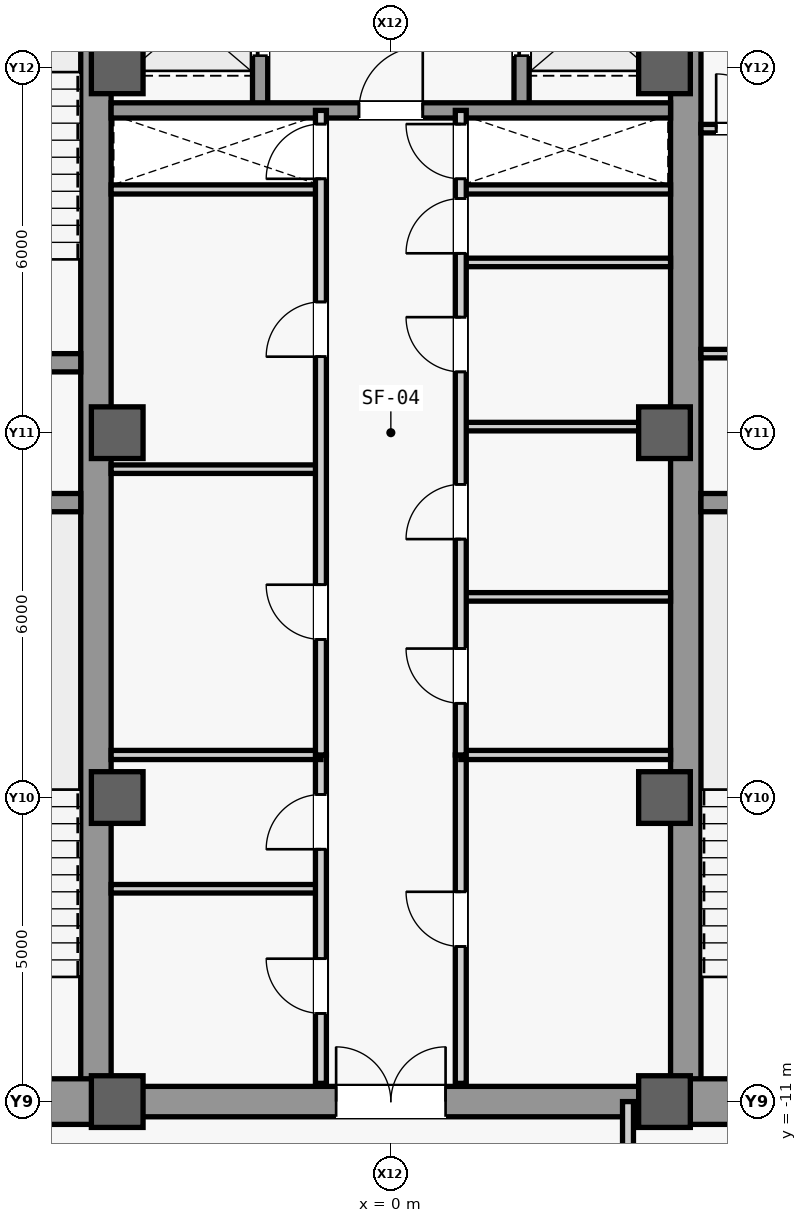
"""IFC4 building model, lengths in metres.
Left out: names, types, materials, properties, quantities, classifications, styles, units other than length and angle.
Written with IfcOpenShell. Run it as: python <this file> out.ifc"""

import sys

from ifc_helpers import new_model, si_unit, direction, frame, frame_2d, origin, origin_2d, place, context, subcontext, project, spatial, rectangle, extrude, source, transform, mapped, element, fill, save


model = new_model("IFC4")
c1 = context("Model", 3, precision=1e-05, world=origin(), true_north=direction((0.0, 1.0)))
c2 = subcontext(c1, "Body", "Model", "MODEL_VIEW")
j1 = project(units=[si_unit("LENGTHUNIT", "METRE"), si_unit("PLANEANGLEUNIT", "RADIAN")], contexts=[c1])
p1 = place(None, origin())
s1 = spatial("IfcSite", under=j1, at=p1, CompositionType="ELEMENT")
p2 = place(p1, origin())
s2 = spatial("IfcBuilding", under=s1, at=p2, CompositionType="ELEMENT")
p3 = place(p2, frame((0.0, 0.0, 207.1)))
s3 = spatial("IfcBuildingStorey", under=s2, at=p3, CompositionType="ELEMENT", Elevation=207.1)
m1 = source(origin(), c2, "Body", "SweptSolid", [
    extrude(rectangle(XDim=21.4, YDim=0.5, at=frame_2d((10.7, 0.0))), origin(), (0.0, 0.0, 1.0), 3.78),
])
for number, where, z_axis, x_axis in (
    (1, (-4.85, -10.7, 0.0), (0.0, 0.0, 1.0), (0.0, 1.0, 0.0)),
    (2, (4.85, -10.7, 0.0), (0.0, 0.0, 1.0), (0.0, 1.0, 0.0)),
):
    element("IfcWall", number, at=place(p3, frame(where, z_axis=z_axis, x_axis=x_axis)), inside=s3, PredefinedType="SHEAR", context=c2, shape_type="MappedRepresentation", body=[
        mapped(m1, transform((0.0, 0.0, 0.0), scale=1.0)),
    ])
m2 = source(origin(), c2, "Body", "SweptSolid", [
    extrude(rectangle(XDim=5.85, YDim=0.75, at=frame_2d((2.925, 0.0))), origin(), (0.0, 0.0, 1.0), 3.78),
])
for number, where, z_axis, x_axis in (
    (3, (-10.7, -11.0, 0.0), (0.0, 0.0, 1.0), (1.0, 0.0, 0.0)),
    (4, (4.85, -11.0, 0.0), (0.0, 0.0, 1.0), (1.0, 0.0, 0.0)),
):
    element("IfcWall", number, at=place(p3, frame(where, z_axis=z_axis, x_axis=x_axis)), inside=s3, PredefinedType="SHEAR", context=c2, shape_type="MappedRepresentation", body=[
        mapped(m2, transform((0.0, 0.0, 0.0), scale=1.0)),
    ])
m3 = source(origin(), c2, "Body", "SweptSolid", [
    extrude(rectangle(XDim=5.6, YDim=0.3, at=frame_2d((2.8, 0.0))), origin(), (0.0, 0.0, 1.0), 3.78),
])
for number, where, z_axis, x_axis in (
    (5, (-10.7, -1.15, 0.0), (0.0, 0.0, 1.0), (1.0, 0.0, 0.0)),
    (6, (-10.7, 1.15, 0.0), (0.0, 0.0, 1.0), (1.0, 0.0, 0.0)),
    (7, (5.1, -1.15, 0.0), (0.0, 0.0, 1.0), (1.0, 0.0, 0.0)),
):
    element("IfcWall", number, at=place(p3, frame(where, z_axis=z_axis, x_axis=x_axis)), inside=s3, PredefinedType="SHEAR", context=c2, shape_type="MappedRepresentation", body=[
        mapped(m3, transform((0.0, 0.0, 0.0), scale=1.0)),
    ])
m4 = source(origin(), c2, "Body", "SweptSolid", [
    extrude(rectangle(XDim=9.2, YDim=0.5, at=frame_2d((4.6, 0.0))), origin(), (0.0, 0.0, 1.0), 3.78),
])
p4 = place(p3, frame((-4.6, -11.0, 0.0), z_axis=(0.0, 0.0, 1.0), x_axis=(1.0, 0.0, 0.0)))
e8 = element("IfcWall", 8, at=p4, inside=s3, PredefinedType="SHEAR", context=c2, shape_type="MappedRepresentation", body=[
    mapped(m4, transform((0.0, 0.0, 0.0), scale=1.0)),
])
m5 = source(origin(), c2, "Body", "SweptSolid", [
    extrude(rectangle(XDim=1.8, YDim=2.25, at=frame_2d((0.9, 1.125))), frame((0.0, 0.26, 0.0), z_axis=(0.0, -1.0, 0.0), x_axis=(1.0, 0.0, 0.0)), (0.0, 0.0, 1.0), 0.52),
])
p5 = place(p4, frame((3.7, 0.0, 0.0)))
e9 = element("IfcOpeningElement", 9, at=p5, cuts=e8, PredefinedType="OPENING", context=c2, shape_type="MappedRepresentation", body=[
    mapped(m5, transform((0.0, 0.0, 0.0), scale=1.0)),
])
m6 = source(origin(), c2, "Body", "SweptSolid", [
    extrude(rectangle(XDim=0.85, YDim=0.85, at=origin_2d()), origin(), (0.0, 0.0, 1.0), 4.0),
])
for number, where, z_axis, x_axis in (
    (10, (-4.5, -11.0, 0.0), (0.0, 0.0, 1.0), (1.0, 0.0, 0.0)),
    (11, (-4.5, -6.0, 0.0), (0.0, 0.0, 1.0), (1.0, 0.0, 0.0)),
    (12, (-4.5, 0.0, 0.0), (0.0, 0.0, 1.0), (1.0, 0.0, 0.0)),
    (13, (-4.5, 6.0, 0.0), (0.0, 0.0, 1.0), (1.0, 0.0, 0.0)),
    (14, (4.5, -11.0, 0.0), (0.0, 0.0, 1.0), (1.0, 0.0, 0.0)),
    (15, (4.5, -6.0, 0.0), (0.0, 0.0, 1.0), (1.0, 0.0, 0.0)),
    (16, (4.5, 0.0, 0.0), (0.0, 0.0, 1.0), (1.0, 0.0, 0.0)),
    (17, (4.5, 6.0, 0.0), (0.0, 0.0, 1.0), (1.0, 0.0, 0.0)),
):
    element("IfcColumn", number, at=place(p3, frame(where, z_axis=z_axis, x_axis=x_axis)), inside=s3, PredefinedType="COLUMN", context=c2, shape_type="MappedRepresentation", body=[
        mapped(m6, transform((0.0, 0.0, 0.0), scale=1.0)),
    ])
m7 = source(origin(), c2, "Body", "SweptSolid", [
    extrude(rectangle(XDim=3.15, YDim=0.14, at=frame_2d((1.575, 0.0))), origin(), (0.0, 0.0, 1.0), 3.78),
])
p6 = place(p3, frame((5.1, 1.3, 0.0), z_axis=(0.0, 0.0, 1.0), x_axis=(1.0, 0.0, 0.0)))
e18 = element("IfcWall", 18, at=p6, inside=s3, PredefinedType="PARTITIONING", context=c2, shape_type="MappedRepresentation", body=[
    mapped(m7, transform((0.0, 0.0, 0.0), scale=1.0)),
])
p7 = place(p3, frame((5.1, 5.0, 0.0), z_axis=(0.0, 0.0, 1.0), x_axis=(1.0, 0.0, 0.0)))
e19 = element("IfcWall", 19, at=p7, inside=s3, PredefinedType="PARTITIONING", context=c2, shape_type="MappedRepresentation", body=[
    mapped(m7, transform((0.0, 0.0, 0.0), scale=1.0)),
])
m8 = source(origin(), c2, "Body", "SweptSolid", [
    extrude(rectangle(XDim=0.9, YDim=2.15, at=frame_2d((0.45, 1.075))), frame((0.0, 0.08, 0.0), z_axis=(0.0, -1.0, 0.0), x_axis=(1.0, 0.0, 0.0)), (0.0, 0.0, 1.0), 0.16),
])
p8 = place(p7, frame((0.25, 0.0, 0.0)))
e20 = element("IfcOpeningElement", 20, at=p8, cuts=e19, PredefinedType="OPENING", context=c2, shape_type="MappedRepresentation", body=[
    mapped(m8, transform((0.0, 0.0, 0.0), scale=1.0)),
])
m9 = source(origin(), c2, "Body", "SweptSolid", [
    extrude(rectangle(XDim=3.45, YDim=0.15, at=frame_2d((1.725, 0.0))), origin(), (0.0, 0.0, 1.0), 3.78),
])
for number, where, z_axis, x_axis in (
    (21, (-4.6, 4.0, 0.0), (0.0, 0.0, 1.0), (1.0, 0.0, 0.0)),
    (22, (1.15, 4.0, 0.0), (0.0, 0.0, 1.0), (1.0, 0.0, 0.0)),
):
    element("IfcWall", number, at=place(p3, frame(where, z_axis=z_axis, x_axis=x_axis)), inside=s3, PredefinedType="PARTITIONING", context=c2, shape_type="MappedRepresentation", body=[
        mapped(m9, transform((0.0, 0.0, 0.0), scale=1.0)),
    ])
m10 = source(origin(), c2, "Body", "SweptSolid", [
    extrude(rectangle(XDim=3.45, YDim=0.14, at=frame_2d((1.725, 0.0))), origin(), (0.0, 0.0, 1.0), 3.78),
])
p9 = place(p3, frame((-4.6, -7.5, 0.0), z_axis=(0.0, 0.0, 1.0), x_axis=(1.0, 0.0, 0.0)))
e23 = element("IfcWall", 23, at=p9, inside=s3, PredefinedType="PARTITIONING", context=c2, shape_type="MappedRepresentation", body=[
    mapped(m10, transform((0.0, 0.0, 0.0), scale=1.0)),
])
m11 = source(origin(), c2, "Body", "SweptSolid", [
    extrude(rectangle(XDim=5.4, YDim=0.18, at=frame_2d((2.7, 0.0))), origin(), (0.0, 0.0, 1.0), 3.78),
])
p10 = place(p3, frame((-1.15, -10.7, 0.0), z_axis=(0.0, 0.0, 1.0), x_axis=(0.0, 1.0, 0.0)))
e24 = element("IfcWall", 24, at=p10, inside=s3, PredefinedType="PARTITIONING", context=c2, shape_type="MappedRepresentation", body=[
    mapped(m11, transform((0.0, 0.0, 0.0), scale=1.0)),
])
m12 = source(origin(), c2, "Body", "SweptSolid", [
    extrude(rectangle(XDim=0.9, YDim=2.15, at=frame_2d((0.45, 1.075))), frame((0.0, 0.1, 0.0), z_axis=(0.0, -1.0, 0.0), x_axis=(1.0, 0.0, 0.0)), (0.0, 0.0, 1.0), 0.2),
])
p11 = place(p10, frame((1.15, 0.0, 0.0)))
e25 = element("IfcOpeningElement", 25, at=p11, cuts=e24, PredefinedType="OPENING", context=c2, shape_type="MappedRepresentation", body=[
    mapped(m12, transform((0.0, 0.0, 0.0), scale=1.0)),
])
p12 = place(p10, frame((3.85, 0.0, 0.0)))
e26 = element("IfcOpeningElement", 26, at=p12, cuts=e24, PredefinedType="OPENING", context=c2, shape_type="MappedRepresentation", body=[
    mapped(m12, transform((0.0, 0.0, 0.0), scale=1.0)),
])
p13 = place(p3, frame((1.15, -10.7, 0.0), z_axis=(0.0, 0.0, 1.0), x_axis=(0.0, 1.0, 0.0)))
e27 = element("IfcWall", 27, at=p13, inside=s3, PredefinedType="PARTITIONING", context=c2, shape_type="MappedRepresentation", body=[
    mapped(m11, transform((0.0, 0.0, 0.0), scale=1.0)),
])
p14 = place(p13, frame((2.25, 0.0, 0.0)))
e28 = element("IfcOpeningElement", 28, at=p14, cuts=e27, PredefinedType="OPENING", context=c2, shape_type="MappedRepresentation", body=[
    mapped(m12, transform((0.0, 0.0, 0.0), scale=1.0)),
])
for number, where, z_axis, x_axis in (
    (29, (-4.6, -5.3, 0.0), (0.0, 0.0, 1.0), (1.0, 0.0, 0.0)),
    (30, (1.15, -5.3, 0.0), (0.0, 0.0, 1.0), (1.0, 0.0, 0.0)),
):
    element("IfcWall", number, at=place(p3, frame(where, z_axis=z_axis, x_axis=x_axis)), inside=s3, PredefinedType="PARTITIONING", context=c2, shape_type="MappedRepresentation", body=[
        mapped(m9, transform((0.0, 0.0, 0.0), scale=1.0)),
    ])
m13 = source(origin(), c2, "Body", "SweptSolid", [
    extrude(rectangle(XDim=5.4, YDim=0.25, at=frame_2d((2.7, 0.0))), origin(), (0.0, 0.0, 1.0), 3.78),
])
p15 = place(p3, frame((-2.15, 5.3, 0.0), z_axis=(0.0, 0.0, 1.0), x_axis=(0.0, 1.0, 0.0)))
e31 = element("IfcWall", 31, at=p15, inside=s3, PredefinedType="SHEAR", context=c2, shape_type="MappedRepresentation", body=[
    mapped(m13, transform((0.0, 0.0, 0.0), scale=1.0)),
])
m14 = source(origin(), c2, "Body", "SweptSolid", [
    extrude(rectangle(XDim=1.2, YDim=2.3, at=frame_2d((0.6, 1.15))), frame((0.0, 0.135, 0.0), z_axis=(0.0, -1.0, 0.0), x_axis=(1.0, 0.0, 0.0)), (0.0, 0.0, 1.0), 0.27),
])
p16 = place(p15, frame((3.3, 0.0, 0.0)))
e32 = element("IfcOpeningElement", 32, at=p16, cuts=e31, PredefinedType="OPENING", context=c2, shape_type="MappedRepresentation", body=[
    mapped(m14, transform((0.0, 0.0, 0.0), scale=1.0)),
])
p17 = place(p15, frame((0.9, 0.0, 0.0)))
e33 = element("IfcOpeningElement", 33, at=p17, cuts=e31, PredefinedType="OPENING", context=c2, shape_type="MappedRepresentation", body=[
    mapped(m14, transform((0.0, 0.0, 0.0), scale=1.0)),
])
p18 = place(p3, frame((2.15, 5.3, 0.0), z_axis=(0.0, 0.0, 1.0), x_axis=(0.0, 1.0, 0.0)))
e34 = element("IfcWall", 34, at=p18, inside=s3, PredefinedType="SHEAR", context=c2, shape_type="MappedRepresentation", body=[
    mapped(m13, transform((0.0, 0.0, 0.0), scale=1.0)),
])
p19 = place(p18, frame((3.3, 0.0, 0.0)))
e35 = element("IfcOpeningElement", 35, at=p19, cuts=e34, PredefinedType="OPENING", context=c2, shape_type="MappedRepresentation", body=[
    mapped(m14, transform((0.0, 0.0, 0.0), scale=1.0)),
])
p20 = place(p18, frame((0.9, 0.0, 0.0)))
e36 = element("IfcOpeningElement", 36, at=p20, cuts=e34, PredefinedType="OPENING", context=c2, shape_type="MappedRepresentation", body=[
    mapped(m14, transform((0.0, 0.0, 0.0), scale=1.0)),
])
m15 = source(origin(), c2, "Body", "SweptSolid", [
    extrude(rectangle(XDim=9.2, YDim=0.25, at=frame_2d((4.6, 0.0))), origin(), (0.0, 0.0, 1.0), 3.78),
])
p21 = place(p3, frame((-4.6, 5.3, 0.0), z_axis=(0.0, 0.0, 1.0), x_axis=(1.0, 0.0, 0.0)))
e37 = element("IfcWall", 37, at=p21, inside=s3, PredefinedType="SHEAR", context=c2, shape_type="MappedRepresentation", body=[
    mapped(m15, transform((0.0, 0.0, 0.0), scale=1.0)),
])
m16 = source(origin(), c2, "Body", "SweptSolid", [
    extrude(rectangle(XDim=1.05, YDim=2.2, at=frame_2d((0.525, 1.1))), frame((0.0, 0.135, 0.0), z_axis=(0.0, -1.0, 0.0), x_axis=(1.0, 0.0, 0.0)), (0.0, 0.0, 1.0), 0.27),
])
p22 = place(p21, frame((4.075, 0.0, 0.0)))
e38 = element("IfcOpeningElement", 38, at=p22, cuts=e37, PredefinedType="OPENING", context=c2, shape_type="MappedRepresentation", body=[
    mapped(m16, transform((0.0, 0.0, 0.0), scale=1.0)),
])
p23 = place(p3, frame((-4.6, -0.6, 0.0), z_axis=(0.0, 0.0, 1.0), x_axis=(1.0, 0.0, 0.0)))
e39 = element("IfcWall", 39, at=p23, inside=s3, PredefinedType="PARTITIONING", context=c2, shape_type="MappedRepresentation", body=[
    mapped(m10, transform((0.0, 0.0, 0.0), scale=1.0)),
])
m17 = source(origin(), c2, "Body", "SweptSolid", [
    extrude(rectangle(XDim=10.6, YDim=0.18, at=frame_2d((5.3, 0.0))), origin(), (0.0, 0.0, 1.0), 3.78),
])
p24 = place(p3, frame((-1.15, -5.3, 0.0), z_axis=(0.0, 0.0, 1.0), x_axis=(0.0, 1.0, 0.0)))
e40 = element("IfcWall", 40, at=p24, inside=s3, PredefinedType="PARTITIONING", context=c2, shape_type="MappedRepresentation", body=[
    mapped(m17, transform((0.0, 0.0, 0.0), scale=1.0)),
])
p25 = place(p24, frame((1.9, 0.0, 0.0)))
e41 = element("IfcOpeningElement", 41, at=p25, cuts=e40, PredefinedType="OPENING", context=c2, shape_type="MappedRepresentation", body=[
    mapped(m12, transform((0.0, 0.0, 0.0), scale=1.0)),
])
p26 = place(p24, frame((6.55, 0.0, 0.0)))
e42 = element("IfcOpeningElement", 42, at=p26, cuts=e40, PredefinedType="OPENING", context=c2, shape_type="MappedRepresentation", body=[
    mapped(m12, transform((0.0, 0.0, 0.0), scale=1.0)),
])
p27 = place(p24, frame((9.475, 0.0, 0.0)))
e43 = element("IfcOpeningElement", 43, at=p27, cuts=e40, PredefinedType="OPENING", context=c2, shape_type="MappedRepresentation", body=[
    mapped(m12, transform((0.0, 0.0, 0.0), scale=1.0)),
])
p28 = place(p3, frame((1.15, -2.7, 0.0), z_axis=(0.0, 0.0, 1.0), x_axis=(1.0, 0.0, 0.0)))
e44 = element("IfcWall", 44, at=p28, inside=s3, PredefinedType="PARTITIONING", context=c2, shape_type="MappedRepresentation", body=[
    mapped(m10, transform((0.0, 0.0, 0.0), scale=1.0)),
])
m18 = source(origin(), c2, "Body", "SweptSolid", [
    extrude(rectangle(XDim=3.45, YDim=0.14, at=frame_2d((1.725, 0.0))), origin(), (0.0, 0.0, 1.0), 3.085),
])
p29 = place(p3, frame((1.15, 0.1, 0.0), z_axis=(0.0, 0.0, 1.0), x_axis=(1.0, 0.0, 0.0)))
e45 = element("IfcWall", 45, at=p29, inside=s3, PredefinedType="PARTITIONING", context=c2, shape_type="MappedRepresentation", body=[
    mapped(m18, transform((0.0, 0.0, 0.0), scale=1.0)),
])
p30 = place(p3, frame((1.15, 2.8, 0.0), z_axis=(0.0, 0.0, 1.0), x_axis=(1.0, 0.0, 0.0)))
e46 = element("IfcWall", 46, at=p30, inside=s3, PredefinedType="PARTITIONING", context=c2, shape_type="MappedRepresentation", body=[
    mapped(m10, transform((0.0, 0.0, 0.0), scale=1.0)),
])
p31 = place(p3, frame((1.15, -5.3, 0.0), z_axis=(0.0, 0.0, 1.0), x_axis=(0.0, 1.0, 0.0)))
e47 = element("IfcWall", 47, at=p31, inside=s3, PredefinedType="PARTITIONING", context=c2, shape_type="MappedRepresentation", body=[
    mapped(m17, transform((0.0, 0.0, 0.0), scale=1.0)),
])
p32 = place(p31, frame((0.85, 0.0, 0.0)))
e48 = element("IfcOpeningElement", 48, at=p32, cuts=e47, PredefinedType="OPENING", context=c2, shape_type="MappedRepresentation", body=[
    mapped(m12, transform((0.0, 0.0, 0.0), scale=1.0)),
])
p33 = place(p31, frame((3.55, 0.0, 0.0)))
e49 = element("IfcOpeningElement", 49, at=p33, cuts=e47, PredefinedType="OPENING", context=c2, shape_type="MappedRepresentation", body=[
    mapped(m12, transform((0.0, 0.0, 0.0), scale=1.0)),
])
p34 = place(p31, frame((6.3, 0.0, 0.0)))
e50 = element("IfcOpeningElement", 50, at=p34, cuts=e47, PredefinedType="OPENING", context=c2, shape_type="MappedRepresentation", body=[
    mapped(m12, transform((0.0, 0.0, 0.0), scale=1.0)),
])
p35 = place(p31, frame((8.25, 0.0, 0.0)))
e51 = element("IfcOpeningElement", 51, at=p35, cuts=e47, PredefinedType="OPENING", context=c2, shape_type="MappedRepresentation", body=[
    mapped(m12, transform((0.0, 0.0, 0.0), scale=1.0)),
])
p36 = place(p31, frame((9.475, 0.0, 0.0)))
e52 = element("IfcOpeningElement", 52, at=p36, cuts=e47, PredefinedType="OPENING", context=c2, shape_type="MappedRepresentation", body=[
    mapped(m12, transform((0.0, 0.0, 0.0), scale=1.0)),
])
m19 = source(origin(), c2, "Body", "SweptSolid", [
    extrude(rectangle(XDim=2.6, YDim=0.18, at=frame_2d((1.3, 0.0))), origin(), (0.0, 0.0, 1.0), 3.78),
])
p37 = place(p3, frame((3.9, -13.6, 0.0), z_axis=(0.0, 0.0, 1.0), x_axis=(0.0, 1.0, 0.0)))
e53 = element("IfcWall", 53, at=p37, inside=s3, PredefinedType="PARTITIONING", context=c2, shape_type="MappedRepresentation", body=[
    mapped(m19, transform((0.0, 0.0, 0.0), scale=1.0)),
])
m20 = source(origin(), c2, "Body", "SweptSolid", [
    extrude(rectangle(XDim=0.9, YDim=2.15, at=frame_2d((0.45, 1.075))), frame((0.0, 0.025, 0.0), z_axis=(0.0, -1.0, 0.0), x_axis=(1.0, 0.0, 0.0)), (0.0, 0.0, 1.0), 0.05),
])
p38 = place(p8, origin())
e54 = element("IfcDoor", 54, at=p38, inside=s3, OperationType="SINGLE_SWING_LEFT", PredefinedType="DOOR", context=c2, shape_type="MappedRepresentation", body=[
    mapped(m20, transform((0.0, 0.0, 0.0), scale=1.0)),
])
fill(e20, e54)
p39 = place(p11, origin())
e55 = element("IfcDoor", 55, at=p39, inside=s3, OperationType="SINGLE_SWING_RIGHT", PredefinedType="DOOR", context=c2, shape_type="MappedRepresentation", body=[
    mapped(m20, transform((0.0, 0.0, 0.0), scale=1.0)),
])
fill(e25, e55)
p40 = place(p12, origin())
e56 = element("IfcDoor", 56, at=p40, inside=s3, OperationType="SINGLE_SWING_LEFT", PredefinedType="DOOR", context=c2, shape_type="MappedRepresentation", body=[
    mapped(m20, transform((0.0, 0.0, 0.0), scale=1.0)),
])
fill(e26, e56)
p41 = place(p14, origin())
e57 = element("IfcDoor", 57, at=p41, inside=s3, OperationType="SINGLE_SWING_RIGHT", PredefinedType="DOOR", context=c2, shape_type="MappedRepresentation", body=[
    mapped(m20, transform((0.0, 0.0, 0.0), scale=1.0)),
])
fill(e28, e57)
m21 = source(origin(), c2, "Body", "SweptSolid", [
    extrude(rectangle(XDim=1.8, YDim=2.25, at=frame_2d((0.9, 1.125))), frame((0.0, 0.025, 0.0), z_axis=(0.0, -1.0, 0.0), x_axis=(1.0, 0.0, 0.0)), (0.0, 0.0, 1.0), 0.05),
])
p42 = place(p5, origin())
e58 = element("IfcDoor", 58, at=p42, inside=s3, OperationType="SINGLE_SWING_LEFT", PredefinedType="DOOR", context=c2, shape_type="MappedRepresentation", body=[
    mapped(m21, transform((0.0, 0.0, 0.0), scale=1.0)),
])
fill(e9, e58)
m22 = source(origin(), c2, "Body", "SweptSolid", [
    extrude(rectangle(XDim=1.05, YDim=2.2, at=frame_2d((0.525, 1.1))), frame((0.0, 0.025, 0.0), z_axis=(0.0, -1.0, 0.0), x_axis=(1.0, 0.0, 0.0)), (0.0, 0.0, 1.0), 0.05),
])
p43 = place(p22, origin())
e59 = element("IfcDoor", 59, at=p43, inside=s3, OperationType="SINGLE_SWING_RIGHT", PredefinedType="DOOR", context=c2, shape_type="MappedRepresentation", body=[
    mapped(m22, transform((0.0, 0.0, 0.0), scale=1.0)),
])
fill(e38, e59)
p44 = place(p25, origin())
e60 = element("IfcDoor", 60, at=p44, inside=s3, OperationType="SINGLE_SWING_RIGHT", PredefinedType="DOOR", context=c2, shape_type="MappedRepresentation", body=[
    mapped(m20, transform((0.0, 0.0, 0.0), scale=1.0)),
])
fill(e41, e60)
p45 = place(p26, origin())
e61 = element("IfcDoor", 61, at=p45, inside=s3, OperationType="SINGLE_SWING_LEFT", PredefinedType="DOOR", context=c2, shape_type="MappedRepresentation", body=[
    mapped(m20, transform((0.0, 0.0, 0.0), scale=1.0)),
])
fill(e42, e61)
p46 = place(p32, origin())
e62 = element("IfcDoor", 62, at=p46, inside=s3, OperationType="SINGLE_SWING_RIGHT", PredefinedType="DOOR", context=c2, shape_type="MappedRepresentation", body=[
    mapped(m20, transform((0.0, 0.0, 0.0), scale=1.0)),
])
fill(e48, e62)
p47 = place(p33, origin())
e63 = element("IfcDoor", 63, at=p47, inside=s3, OperationType="SINGLE_SWING_LEFT", PredefinedType="DOOR", context=c2, shape_type="MappedRepresentation", body=[
    mapped(m20, transform((0.0, 0.0, 0.0), scale=1.0)),
])
fill(e49, e63)
p48 = place(p34, origin())
e64 = element("IfcDoor", 64, at=p48, inside=s3, OperationType="SINGLE_SWING_RIGHT", PredefinedType="DOOR", context=c2, shape_type="MappedRepresentation", body=[
    mapped(m20, transform((0.0, 0.0, 0.0), scale=1.0)),
])
fill(e50, e64)
p49 = place(p35, origin())
e65 = element("IfcDoor", 65, at=p49, inside=s3, OperationType="SINGLE_SWING_LEFT", PredefinedType="DOOR", context=c2, shape_type="MappedRepresentation", body=[
    mapped(m20, transform((0.0, 0.0, 0.0), scale=1.0)),
])
fill(e51, e65)
p50 = place(p27, origin())
e66 = element("IfcDoor", 66, at=p50, inside=s3, OperationType="SINGLE_SWING_LEFT", PredefinedType="DOOR", context=c2, shape_type="MappedRepresentation", body=[
    mapped(m20, transform((0.0, 0.0, 0.0), scale=1.0)),
])
fill(e43, e66)
p51 = place(p36, origin())
e67 = element("IfcDoor", 67, at=p51, inside=s3, OperationType="SINGLE_SWING_RIGHT", PredefinedType="DOOR", context=c2, shape_type="MappedRepresentation", body=[
    mapped(m20, transform((0.0, 0.0, 0.0), scale=1.0)),
])
fill(e52, e67)
m23 = source(origin(), c2, "Body", "SweptSolid", [
    extrude(rectangle(XDim=1.2, YDim=2.3, at=frame_2d((0.6, 1.15))), frame((0.0, 0.025, 0.0), z_axis=(0.0, -1.0, 0.0), x_axis=(1.0, 0.0, 0.0)), (0.0, 0.0, 1.0), 0.05),
])
p52 = place(p17, origin())
e68 = element("IfcDoor", 68, at=p52, inside=s3, OperationType="SLIDING_TO_LEFT", PredefinedType="DOOR", context=c2, shape_type="MappedRepresentation", body=[
    mapped(m23, transform((0.0, 0.0, 0.0), scale=1.0)),
])
fill(e33, e68)
p53 = place(p20, origin())
e69 = element("IfcDoor", 69, at=p53, inside=s3, OperationType="SLIDING_TO_LEFT", PredefinedType="DOOR", context=c2, shape_type="MappedRepresentation", body=[
    mapped(m23, transform((0.0, 0.0, 0.0), scale=1.0)),
])
fill(e36, e69)
save(model, sys.argv[1])
